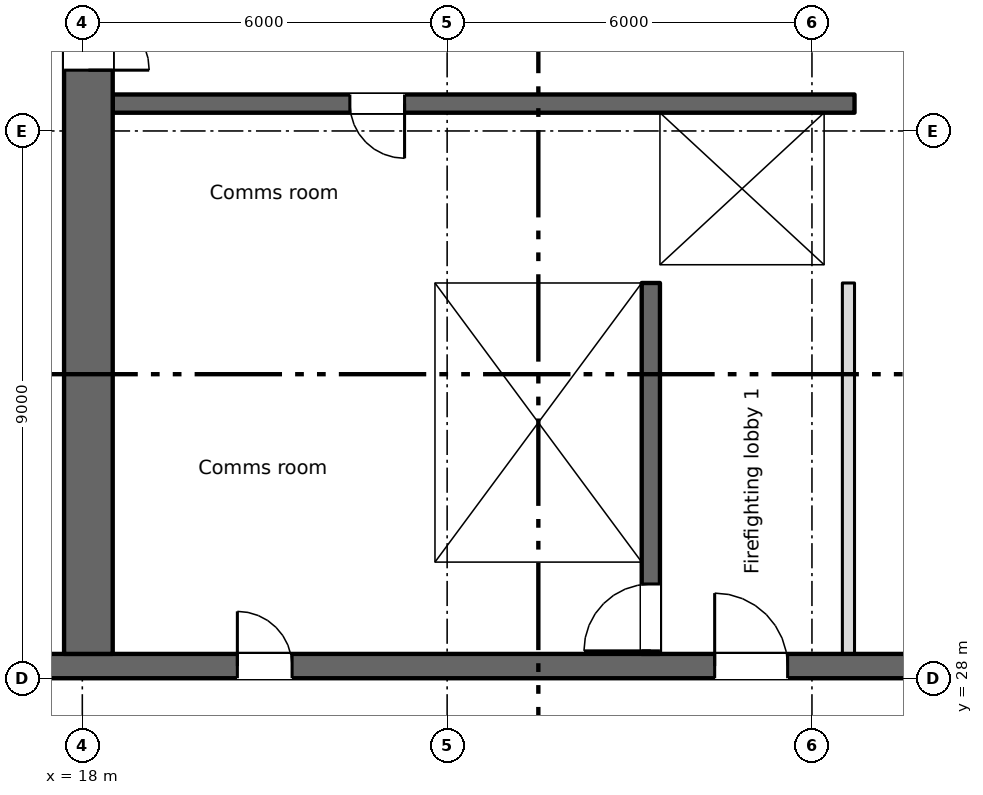
"""IFC4 building model, lengths in metres.
Left out: names, types, materials, properties, quantities, classifications, styles, units other than length and angle.
Written with IfcOpenShell. Run it as: python <this file> out.ifc"""

import sys

from ifc_helpers import new_model, si_unit, direction, frame, frame_2d, origin, place, context, subcontext, project, spatial, rectangle, extrude, element, fill, save


model = new_model("IFC4")
c1 = context("Model", 3, precision=1e-05, world=origin(), true_north=direction((0.0, 1.0)))
c2 = subcontext(c1, "Body", "Model", "MODEL_VIEW")
j1 = project(units=[si_unit("LENGTHUNIT", "METRE"), si_unit("PLANEANGLEUNIT", "RADIAN")], contexts=[c1])
p1 = place(None, origin())
s1 = spatial("IfcSite", under=j1, at=p1, CompositionType="ELEMENT")
p2 = place(p1, origin())
s2 = spatial("IfcBuilding", under=s1, at=p2, CompositionType="ELEMENT")
p3 = place(p2, frame((0.0, 0.0, 106.25)))
s3 = spatial("IfcBuildingStorey", under=s2, at=p3, CompositionType="ELEMENT", Elevation=106.25)
p4 = place(p3, frame((6.7, 28.2, 0.0), z_axis=(0.0, 0.0, 1.0), x_axis=(1.0, 0.0, 0.0)))
e1 = element("IfcWall", 1, at=p4, inside=s3, PredefinedType="SHEAR", context=c2, shape_type="SweptSolid", body=[
    extrude(rectangle(XDim=57.8, YDim=0.4, at=frame_2d((28.9, 0.0))), origin(), (0.0, 0.0, 1.0), 3.35),
])
p5 = place(p4, frame((13.85, 0.0, 0.0)))
e2 = element("IfcOpeningElement", 2, at=p5, cuts=e1, PredefinedType="OPENING", context=c2, shape_type="SweptSolid", body=[
    extrude(rectangle(XDim=0.9, YDim=2.1, at=frame_2d((0.45, 1.05))), frame((0.0, 0.21, 0.0), z_axis=(0.0, -1.0, 0.0), x_axis=(1.0, 0.0, 0.0)), (0.0, 0.0, 1.0), 0.42),
])
p6 = place(p4, frame((48.562, 0.0, 0.0)))
e3 = element("IfcOpeningElement", 3, at=p6, cuts=e1, PredefinedType="OPENING", context=c2, shape_type="SweptSolid", body=[
    extrude(rectangle(XDim=0.9, YDim=2.1, at=frame_2d((0.45, 1.05))), frame((0.0, 0.21, 0.0), z_axis=(0.0, -1.0, 0.0), x_axis=(1.0, 0.0, 0.0)), (0.0, 0.0, 1.0), 0.42),
])
p7 = place(p4, frame((51.137, 0.0, 0.0)))
e4 = element("IfcOpeningElement", 4, at=p7, cuts=e1, PredefinedType="OPENING", context=c2, shape_type="SweptSolid", body=[
    extrude(rectangle(XDim=0.9, YDim=2.1, at=frame_2d((0.45, 1.05))), frame((0.0, 0.21, 0.0), z_axis=(0.0, -1.0, 0.0), x_axis=(1.0, 0.0, 0.0)), (0.0, 0.0, 1.0), 0.42),
])
p8 = place(p4, frame((1.35, 0.0, 0.0)))
e5 = element("IfcOpeningElement", 5, at=p8, cuts=e1, PredefinedType="OPENING", context=c2, shape_type="SweptSolid", body=[
    extrude(rectangle(XDim=0.9, YDim=2.1, at=frame_2d((0.45, 1.05))), frame((0.0, 0.21, 0.0), z_axis=(0.0, -1.0, 0.0), x_axis=(1.0, 0.0, 0.0)), (0.0, 0.0, 1.0), 0.42),
])
p9 = place(p4, frame((4.7, 0.0, 0.0)))
e6 = element("IfcOpeningElement", 6, at=p9, cuts=e1, PredefinedType="OPENING", context=c2, shape_type="SweptSolid", body=[
    extrude(rectangle(XDim=1.2, YDim=2.1, at=frame_2d((0.6, 1.05))), frame((0.0, 0.21, 0.0), z_axis=(0.0, -1.0, 0.0), x_axis=(1.0, 0.0, 0.0)), (0.0, 0.0, 1.0), 0.42),
])
p10 = place(p4, frame((31.7, 0.0, 0.0)))
e7 = element("IfcOpeningElement", 7, at=p10, cuts=e1, PredefinedType="OPENING", context=c2, shape_type="SweptSolid", body=[
    extrude(rectangle(XDim=1.2, YDim=2.1, at=frame_2d((0.6, 1.05))), frame((0.0, 0.21, 0.0), z_axis=(0.0, -1.0, 0.0), x_axis=(1.0, 0.0, 0.0)), (0.0, 0.0, 1.0), 0.42),
])
p11 = place(p4, frame((55.2, 0.0, 0.0)))
e8 = element("IfcOpeningElement", 8, at=p11, cuts=e1, PredefinedType="OPENING", context=c2, shape_type="SweptSolid", body=[
    extrude(rectangle(XDim=1.2, YDim=2.1, at=frame_2d((0.6, 1.05))), frame((0.0, 0.21, 0.0), z_axis=(0.0, -1.0, 0.0), x_axis=(1.0, 0.0, 0.0)), (0.0, 0.0, 1.0), 0.42),
])
p12 = place(p4, frame((21.7, 0.0, 0.0)))
e9 = element("IfcOpeningElement", 9, at=p12, cuts=e1, PredefinedType="OPENING", context=c2, shape_type="SweptSolid", body=[
    extrude(rectangle(XDim=1.2, YDim=2.1, at=frame_2d((0.6, 1.05))), frame((0.0, 0.21, 0.0), z_axis=(0.0, -1.0, 0.0), x_axis=(1.0, 0.0, 0.0)), (0.0, 0.0, 1.0), 0.42),
])
p13 = place(p4, frame((41.7, 0.0, 0.0)))
e10 = element("IfcOpeningElement", 10, at=p13, cuts=e1, PredefinedType="OPENING", context=c2, shape_type="SweptSolid", body=[
    extrude(rectangle(XDim=1.2, YDim=2.1, at=frame_2d((0.6, 1.05))), frame((0.0, 0.21, 0.0), z_axis=(0.0, -1.0, 0.0), x_axis=(1.0, 0.0, 0.0)), (0.0, 0.0, 1.0), 0.42),
])
p14 = place(p4, frame((24.85, 0.0, 0.0)))
e11 = element("IfcOpeningElement", 11, at=p14, cuts=e1, PredefinedType="OPENING", context=c2, shape_type="SweptSolid", body=[
    extrude(rectangle(XDim=2.4, YDim=2.1, at=frame_2d((1.2, 1.05))), frame((0.0, 0.21, 0.0), z_axis=(0.0, -1.0, 0.0), x_axis=(1.0, 0.0, 0.0)), (0.0, 0.0, 1.0), 0.42),
])
p15 = place(p4, frame((37.35, 0.0, 0.0)))
e12 = element("IfcOpeningElement", 12, at=p15, cuts=e1, PredefinedType="OPENING", context=c2, shape_type="SweptSolid", body=[
    extrude(rectangle(XDim=2.4, YDim=2.1, at=frame_2d((1.2, 1.05))), frame((0.0, 0.21, 0.0), z_axis=(0.0, -1.0, 0.0), x_axis=(1.0, 0.0, 0.0)), (0.0, 0.0, 1.0), 0.42),
])
p16 = place(p4, frame((7.95, 0.0, 0.0)))
e13 = element("IfcOpeningElement", 13, at=p16, cuts=e1, PredefinedType="OPENING", context=c2, shape_type="SweptSolid", body=[
    extrude(rectangle(XDim=2.4, YDim=2.1, at=frame_2d((1.2, 1.05))), frame((0.0, 0.21, 0.0), z_axis=(0.0, -1.0, 0.0), x_axis=(1.0, 0.0, 0.0)), (0.0, 0.0, 1.0), 0.42),
])
p17 = place(p4, frame((28.85, 0.0, 0.0)))
e14 = element("IfcOpeningElement", 14, at=p17, cuts=e1, PredefinedType="OPENING", context=c2, shape_type="SweptSolid", body=[
    extrude(rectangle(XDim=0.9, YDim=2.1, at=frame_2d((0.45, 1.05))), frame((0.0, 0.21, 0.0), z_axis=(0.0, -1.0, 0.0), x_axis=(1.0, 0.0, 0.0)), (0.0, 0.0, 1.0), 0.42),
])
p18 = place(p4, frame((34.85, 0.0, 0.0)))
e15 = element("IfcOpeningElement", 15, at=p18, cuts=e1, PredefinedType="OPENING", context=c2, shape_type="SweptSolid", body=[
    extrude(rectangle(XDim=0.9, YDim=2.1, at=frame_2d((0.45, 1.05))), frame((0.0, 0.21, 0.0), z_axis=(0.0, -1.0, 0.0), x_axis=(1.0, 0.0, 0.0)), (0.0, 0.0, 1.0), 0.42),
])
p19 = place(p3, frame((18.1, 28.4, 0.0), z_axis=(0.0, 0.0, 1.0), x_axis=(0.0, 1.0, 0.0)))
e16 = element("IfcWall", 16, at=p19, inside=s3, PredefinedType="SHEAR", context=c2, shape_type="SweptSolid", body=[
    extrude(rectangle(XDim=16.8, YDim=0.8, at=frame_2d((8.4, 0.0))), origin(), (0.0, 0.0, 1.0), 3.35),
])
p20 = place(p19, frame((9.6, 0.0, 0.0)))
e17 = element("IfcOpeningElement", 17, at=p20, cuts=e16, PredefinedType="OPENING", context=c2, shape_type="SweptSolid", body=[
    extrude(rectangle(XDim=2.0, YDim=2.1, at=frame_2d((1.0, 1.05))), frame((0.0, 0.41, 0.0), z_axis=(0.0, -1.0, 0.0), x_axis=(1.0, 0.0, 0.0)), (0.0, 0.0, 1.0), 0.82),
])
p21 = place(p19, frame((15.35, 0.0, 0.0)))
e18 = element("IfcOpeningElement", 18, at=p21, cuts=e16, PredefinedType="OPENING", context=c2, shape_type="SweptSolid", body=[
    extrude(rectangle(XDim=1.2, YDim=2.1, at=frame_2d((0.6, 1.05))), frame((0.0, 0.41, 0.0), z_axis=(0.0, -1.0, 0.0), x_axis=(1.0, 0.0, 0.0)), (0.0, 0.0, 1.0), 0.82),
])
p22 = place(p3, frame((23.65, 28.4, 0.0), z_axis=(0.0, 0.0, 1.0), x_axis=(0.0, 1.0, 0.0)))
e19 = element("IfcWall", 19, at=p22, inside=s3, PredefinedType="SHEAR", context=c2, shape_type="SweptSolid", body=[
    extrude(rectangle(XDim=6.1, YDim=0.3, at=frame_2d((3.05, 0.0))), origin(), (0.0, 0.0, 1.0), 3.35),
])
p23 = place(p3, frame((27.35, 28.4, 0.0), z_axis=(0.0, 0.0, 1.0), x_axis=(0.0, 1.0, 0.0)))
e20 = element("IfcWall", 20, at=p23, inside=s3, PredefinedType="SHEAR", context=c2, shape_type="SweptSolid", body=[
    extrude(rectangle(XDim=6.1, YDim=0.3, at=frame_2d((3.05, 0.0))), origin(), (0.0, 0.0, 1.0), 3.35),
])
p24 = place(p23, frame((0.05, 0.0, 0.0)))
e21 = element("IfcOpeningElement", 21, at=p24, cuts=e20, PredefinedType="OPENING", context=c2, shape_type="SweptSolid", body=[
    extrude(rectangle(XDim=1.1, YDim=2.1, at=frame_2d((0.55, 1.05))), frame((0.0, 0.16, 0.0), z_axis=(0.0, -1.0, 0.0), x_axis=(1.0, 0.0, 0.0)), (0.0, 0.0, 1.0), 0.32),
])
p25 = place(p3, frame((18.5, 34.65, 0.0), z_axis=(0.0, 0.0, 1.0), x_axis=(1.0, 0.0, 0.0)))
e22 = element("IfcWall", 22, at=p25, inside=s3, PredefinedType="SHEAR", context=c2, shape_type="SweptSolid", body=[
    extrude(rectangle(XDim=12.2, YDim=0.3, at=frame_2d((6.1, 0.0))), origin(), (0.0, 0.0, 1.0), 3.35),
])
p26 = place(p25, frame((9.8, 0.0, 0.0)))
e23 = element("IfcOpeningElement", 23, at=p26, cuts=e22, PredefinedType="OPENING", context=c2, shape_type="SweptSolid", body=[
    extrude(rectangle(XDim=1.1, YDim=2.1, at=frame_2d((0.55, 1.05))), frame((0.0, 0.16, 0.0), z_axis=(0.0, -1.0, 0.0), x_axis=(1.0, 0.0, 0.0)), (0.0, 0.0, 1.0), 0.32),
])
p27 = place(p3, frame((30.7, 37.45, 0.0), z_axis=(0.0, 0.0, 1.0), x_axis=(-1.0, 0.0, 0.0)))
e24 = element("IfcWall", 24, at=p27, inside=s3, PredefinedType="SHEAR", context=c2, shape_type="SweptSolid", body=[
    extrude(rectangle(XDim=12.2, YDim=0.3, at=frame_2d((6.1, 0.0))), origin(), (0.0, 0.0, 1.0), 3.35),
])
p28 = place(p27, frame((7.4, 0.0, 0.0)))
e25 = element("IfcOpeningElement", 25, at=p28, cuts=e24, PredefinedType="OPENING", context=c2, shape_type="SweptSolid", body=[
    extrude(rectangle(XDim=0.9, YDim=2.1, at=frame_2d((0.45, 1.05))), frame((0.0, 0.16, 0.0), z_axis=(0.0, -1.0, 0.0), x_axis=(1.0, 0.0, 0.0)), (0.0, 0.0, 1.0), 0.32),
])
p29 = place(p3, frame((27.35, 34.8, 0.0), z_axis=(0.0, 0.0, 1.0), x_axis=(0.0, 1.0, 0.0)))
e26 = element("IfcWall", 26, at=p29, inside=s3, PredefinedType="SHEAR", context=c2, shape_type="SweptSolid", body=[
    extrude(rectangle(XDim=2.5, YDim=0.3, at=frame_2d((1.25, 0.0))), origin(), (0.0, 0.0, 1.0), 3.35),
])
p30 = place(p3, frame((30.45, 34.8, 0.0), z_axis=(0.0, 0.0, 1.0), x_axis=(0.0, 1.0, 0.0)))
e27 = element("IfcWall", 27, at=p30, inside=s3, PredefinedType="SHEAR", context=c2, shape_type="SweptSolid", body=[
    extrude(rectangle(XDim=2.5, YDim=0.5, at=frame_2d((1.25, 0.0))), origin(), (0.0, 0.0, 1.0), 3.35),
])
p31 = place(p3, frame((30.6, 28.4, 0.0), z_axis=(0.0, 0.0, 1.0), x_axis=(0.0, 1.0, 0.0)))
e28 = element("IfcWall", 28, at=p31, inside=s3, PredefinedType="PARTITIONING", context=c2, shape_type="SweptSolid", body=[
    extrude(rectangle(XDim=6.1, YDim=0.2, at=frame_2d((3.05, 0.0))), origin(), (0.0, 0.0, 1.0), 3.35),
])
p32 = place(p5, origin())
e29 = element("IfcDoor", 29, at=p32, inside=s3, OperationType="SINGLE_SWING_LEFT", PredefinedType="DOOR", context=c2, shape_type="SweptSolid", body=[
    extrude(rectangle(XDim=0.9, YDim=2.1, at=frame_2d((0.45, 1.05))), frame((0.0, 0.025, 0.0), z_axis=(0.0, -1.0, 0.0), x_axis=(1.0, 0.0, 0.0)), (0.0, 0.0, 1.0), 0.05),
])
fill(e2, e29)
p33 = place(p28, origin())
e30 = element("IfcDoor", 30, at=p33, inside=s3, OperationType="SINGLE_SWING_LEFT", PredefinedType="DOOR", context=c2, shape_type="SweptSolid", body=[
    extrude(rectangle(XDim=0.9, YDim=2.1, at=frame_2d((0.45, 1.05))), frame((0.0, 0.025, 0.0), z_axis=(0.0, -1.0, 0.0), x_axis=(1.0, 0.0, 0.0)), (0.0, 0.0, 1.0), 0.05),
])
fill(e25, e30)
p34 = place(p26, origin())
e31 = element("IfcDoor", 31, at=p34, inside=s3, OperationType="SLIDING_TO_LEFT", PredefinedType="DOOR", context=c2, shape_type="SweptSolid", body=[
    extrude(rectangle(XDim=1.1, YDim=2.1, at=frame_2d((0.55, 1.05))), frame((0.0, 0.025, 0.0), z_axis=(0.0, -1.0, 0.0), x_axis=(1.0, 0.0, 0.0)), (0.0, 0.0, 1.0), 0.05),
])
fill(e23, e31)
p35 = place(p24, origin())
e32 = element("IfcDoor", 32, at=p35, inside=s3, OperationType="SINGLE_SWING_LEFT", PredefinedType="DOOR", context=c2, shape_type="SweptSolid", body=[
    extrude(rectangle(XDim=1.1, YDim=2.1, at=frame_2d((0.55, 1.05))), frame((0.0, 0.025, 0.0), z_axis=(0.0, -1.0, 0.0), x_axis=(1.0, 0.0, 0.0)), (0.0, 0.0, 1.0), 0.05),
])
fill(e21, e32)
p36 = place(p12, origin())
e33 = element("IfcDoor", 33, at=p36, inside=s3, OperationType="SINGLE_SWING_LEFT", PredefinedType="DOOR", context=c2, shape_type="SweptSolid", body=[
    extrude(rectangle(XDim=1.2, YDim=2.1, at=frame_2d((0.6, 1.05))), frame((0.0, 0.025, 0.0), z_axis=(0.0, -1.0, 0.0), x_axis=(1.0, 0.0, 0.0)), (0.0, 0.0, 1.0), 0.05),
])
fill(e9, e33)
p37 = place(p20, origin())
e34 = element("IfcDoor", 34, at=p37, inside=s3, OperationType="DOUBLE_DOOR_SINGLE_SWING", PredefinedType="DOOR", context=c2, shape_type="SweptSolid", body=[
    extrude(rectangle(XDim=2.0, YDim=2.1, at=frame_2d((1.0, 1.05))), frame((0.0, 0.025, 0.0), z_axis=(0.0, -1.0, 0.0), x_axis=(1.0, 0.0, 0.0)), (0.0, 0.0, 1.0), 0.05),
])
fill(e17, e34)
save(model, sys.argv[1])
